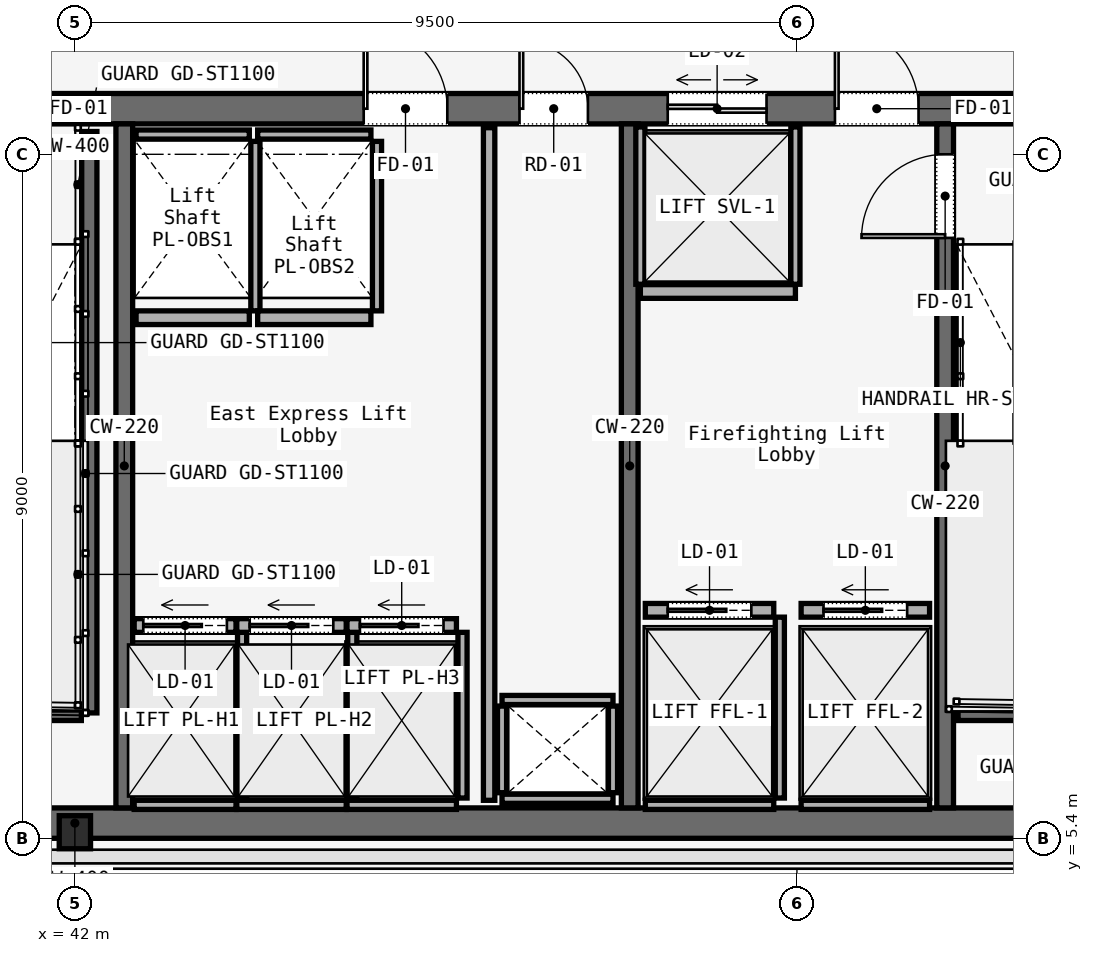
"""IFC4 building model, lengths in metres.
Left out: names, types, materials, properties, quantities, classifications, styles, units other than length and angle.
Written with IfcOpenShell. Run it as: python <this file> out.ifc"""

import sys

from ifc_helpers import new_model, si_unit, direction, frame, frame_2d, origin, origin_2d, place, context, subcontext, project, spatial, rectangle, i_section, extrude, element, fill, save


model = new_model("IFC4")
c1 = context("Model", 3, precision=1e-05, world=origin(), true_north=direction((0.0, 1.0)))
c2 = subcontext(c1, "Body", "Model", "MODEL_VIEW")
j1 = project(units=[si_unit("LENGTHUNIT", "METRE"), si_unit("PLANEANGLEUNIT", "RADIAN")], contexts=[c1])
p1 = place(None, origin())
s1 = spatial("IfcSite", under=j1, at=p1, CompositionType="ELEMENT")
p2 = place(p1, origin())
s2 = spatial("IfcBuilding", under=s1, at=p2, CompositionType="ELEMENT")
p3 = place(p2, frame((0.0, 0.0, 237.0)))
s3 = spatial("IfcBuildingStorey", under=s2, at=p3, CompositionType="ELEMENT", Elevation=237.0)
p4 = place(p3, frame((26.45, 15.0, 0.0), z_axis=(0.0, 0.0, 1.0), x_axis=(1.0, 0.0, 0.0)))
e1 = element("IfcWall", 1, at=p4, inside=s3, PredefinedType="SOLIDWALL", context=c2, shape_type="SweptSolid", body=[
    extrude(rectangle(XDim=31.1, YDim=0.4, at=frame_2d((15.55, 0.0))), origin(), (0.0, 0.0, 1.0), 3.58),
])
p5 = place(p4, frame((1.65, 0.0, 0.0)))
e2 = element("IfcOpeningElement", 2, at=p5, cuts=e1, PredefinedType="OPENING", context=c2, shape_type="SweptSolid", body=[
    extrude(rectangle(XDim=1.1, YDim=2.2, at=frame_2d((0.55, 1.1))), frame((0.0, 0.2, 0.0), z_axis=(0.0, -1.0, 0.0), x_axis=(1.0, 0.0, 0.0)), (0.0, 0.0, 1.0), 0.4),
])
p6 = place(p4, frame((13.65, 0.0, 0.0)))
e3 = element("IfcOpeningElement", 3, at=p6, cuts=e1, PredefinedType="OPENING", context=c2, shape_type="SweptSolid", body=[
    extrude(rectangle(XDim=1.1, YDim=2.2, at=frame_2d((0.55, 1.1))), frame((0.0, 0.2, 0.0), z_axis=(0.0, -1.0, 0.0), x_axis=(1.0, 0.0, 0.0)), (0.0, 0.0, 1.0), 0.4),
])
p7 = place(p4, frame((25.55, 0.0, 0.0)))
e4 = element("IfcOpeningElement", 4, at=p7, cuts=e1, PredefinedType="OPENING", context=c2, shape_type="SweptSolid", body=[
    extrude(rectangle(XDim=1.1, YDim=2.2, at=frame_2d((0.55, 1.1))), frame((0.0, 0.2, 0.0), z_axis=(0.0, -1.0, 0.0), x_axis=(1.0, 0.0, 0.0)), (0.0, 0.0, 1.0), 0.4),
])
p8 = place(p4, frame((19.35, 0.0, 0.0)))
e5 = element("IfcOpeningElement", 5, at=p8, cuts=e1, PredefinedType="OPENING", context=c2, shape_type="SweptSolid", body=[
    extrude(rectangle(XDim=1.1, YDim=2.2, at=frame_2d((0.55, 1.1))), frame((0.0, 0.2, 0.0), z_axis=(0.0, -1.0, 0.0), x_axis=(1.0, 0.0, 0.0)), (0.0, 0.0, 1.0), 0.4),
])
p9 = place(p4, frame((21.4, 0.0, 0.0)))
e6 = element("IfcOpeningElement", 6, at=p9, cuts=e1, PredefinedType="OPENING", context=c2, shape_type="SweptSolid", body=[
    extrude(rectangle(XDim=0.9, YDim=2.1, at=frame_2d((0.45, 1.05))), frame((0.0, 0.2, 0.0), z_axis=(0.0, -1.0, 0.0), x_axis=(1.0, 0.0, 0.0)), (0.0, 0.0, 1.0), 0.4),
])
p10 = place(p4, frame((6.54, 0.0, 0.0)))
e7 = element("IfcOpeningElement", 7, at=p10, cuts=e1, PredefinedType="OPENING", context=c2, shape_type="SweptSolid", body=[
    extrude(rectangle(XDim=0.95, YDim=2.2, at=frame_2d((0.475, 1.1))), frame((0.0, 0.2, 0.0), z_axis=(0.0, -1.0, 0.0), x_axis=(1.0, 0.0, 0.0)), (0.0, 0.0, 1.0), 0.4),
])
p11 = place(p4, frame((10.49, 0.0, 0.0)))
e8 = element("IfcOpeningElement", 8, at=p11, cuts=e1, PredefinedType="OPENING", context=c2, shape_type="SweptSolid", body=[
    extrude(rectangle(XDim=0.95, YDim=2.2, at=frame_2d((0.475, 1.1))), frame((0.0, 0.2, 0.0), z_axis=(0.0, -1.0, 0.0), x_axis=(1.0, 0.0, 0.0)), (0.0, 0.0, 1.0), 0.4),
])
p12 = place(p4, frame((23.35, 0.0, 0.0)))
e9 = element("IfcOpeningElement", 9, at=p12, cuts=e1, PredefinedType="OPENING", context=c2, shape_type="SweptSolid", body=[
    extrude(rectangle(XDim=1.3, YDim=2.3, at=frame_2d((0.65, 1.15))), frame((0.0, 0.2, 0.0), z_axis=(0.0, -1.0, 0.0), x_axis=(1.0, 0.0, 0.0)), (0.0, 0.0, 1.0), 0.4),
])
p13 = place(p3, frame((26.45, 5.6, 0.0), z_axis=(0.0, 0.0, 1.0), x_axis=(1.0, 0.0, 0.0)))
e10 = element("IfcWall", 10, at=p13, inside=s3, PredefinedType="SOLIDWALL", context=c2, shape_type="SweptSolid", body=[
    extrude(rectangle(XDim=31.1, YDim=0.4, at=frame_2d((15.55, 0.0))), origin(), (0.0, 0.0, 1.0), 3.58),
])
for number, where, z_axis, x_axis in (
    (11, (42.65, 5.8, 0.0), (0.0, 0.0, 1.0), (0.0, 1.0, 0.0)),
    (12, (49.3, 5.8, 0.0), (0.0, 0.0, 1.0), (0.0, 1.0, 0.0)),
):
    element("IfcWall", number, at=place(p3, frame(where, z_axis=z_axis, x_axis=x_axis)), inside=s3, PredefinedType="SOLIDWALL", context=c2, shape_type="SweptSolid", body=[
        extrude(rectangle(XDim=9.0, YDim=0.22, at=frame_2d((4.5, 0.0))), origin(), (0.0, 0.0, 1.0), 3.58),
    ])
p14 = place(p3, frame((53.45, 5.8, 0.0), z_axis=(0.0, 0.0, 1.0), x_axis=(0.0, 1.0, 0.0)))
e13 = element("IfcWall", 13, at=p14, inside=s3, PredefinedType="SOLIDWALL", context=c2, shape_type="SweptSolid", body=[
    extrude(rectangle(XDim=9.0, YDim=0.22, at=frame_2d((4.5, 0.0))), origin(), (0.0, 0.0, 1.0), 3.58),
])
p15 = place(p14, frame((7.5, 0.0, 0.0)))
e14 = element("IfcOpeningElement", 14, at=p15, cuts=e13, PredefinedType="OPENING", context=c2, shape_type="SweptSolid", body=[
    extrude(rectangle(XDim=1.1, YDim=2.2, at=frame_2d((0.55, 1.1))), frame((0.0, 0.11, 0.0), z_axis=(0.0, -1.0, 0.0), x_axis=(1.0, 0.0, 0.0)), (0.0, 0.0, 1.0), 0.22),
])
p16 = place(p3, frame((42.0, 5.48, 0.0), z_axis=(0.0, 0.0, 1.0), x_axis=(1.0, 0.0, 0.0)))
e15 = element("IfcColumn", 15, at=p16, inside=s3, PredefinedType="COLUMN", context=c2, shape_type="SweptSolid", body=[
    extrude(i_section(OverallWidth=0.412, OverallDepth=0.435, WebThickness=0.036, FlangeThickness=0.044, FilletRadius=0.015, at=origin_2d()), origin(), (0.0, 0.0, 1.0), 3.58),
])
p17 = place(p3, frame((42.19, 14.7, 0.0), z_axis=(0.0, 0.0, 1.0), x_axis=(0.0, -1.0, 0.0)))
e16 = element("IfcWall", 16, at=p17, inside=s3, PredefinedType="SOLIDWALL", context=c2, shape_type="SweptSolid", body=[
    extrude(rectangle(XDim=7.65, YDim=0.2, at=frame_2d((3.825, 0.0))), origin(), (0.0, 0.0, 1.0), 3.8),
])
for number, where, z_axis, x_axis in (
    (17, (38.97, 7.05, 0.0), (0.0, 0.0, 1.0), (1.0, 0.0, 0.0)),
    (18, (53.62, 7.05, 0.0), (0.0, 0.0, 1.0), (1.0, 0.0, 0.0)),
):
    element("IfcWall", number, at=place(p3, frame(where, z_axis=z_axis, x_axis=x_axis)), inside=s3, PredefinedType="SOLIDWALL", context=c2, shape_type="SweptSolid", body=[
        extrude(rectangle(XDim=3.115, YDim=0.2, at=frame_2d((1.558, 0.0))), origin(), (0.0, 0.0, 1.0), 3.8),
    ])
for number, where, z_axis, x_axis in (
    (19, (47.62, 5.92, 0.0), (0.0, 0.0, 1.0), (1.0, 0.0, 0.0)),
    (20, (47.62, 7.22, 0.0), (0.0, 0.0, 1.0), (1.0, 0.0, 0.0)),
):
    element("IfcWall", number, at=place(p3, frame(where, z_axis=z_axis, x_axis=x_axis)), inside=s3, PredefinedType="SOLIDWALL", context=c2, shape_type="SweptSolid", body=[
        extrude(rectangle(XDim=1.46, YDim=0.12, at=frame_2d((0.73, 0.0))), origin(), (0.0, 0.0, 1.0), 3.01),
    ])
for number, where, z_axis, x_axis in (
    (21, (47.62, 6.0, 0.0), (0.0, 0.0, 1.0), (0.0, 1.0, 0.0)),
    (22, (49.08, 6.0, 0.0), (0.0, 0.0, 1.0), (0.0, 1.0, 0.0)),
):
    element("IfcWall", number, at=place(p3, frame(where, z_axis=z_axis, x_axis=x_axis)), inside=s3, PredefinedType="SOLIDWALL", context=c2, shape_type="SweptSolid", body=[
        extrude(rectangle(XDim=1.14, YDim=0.12, at=frame_2d((0.57, 0.0))), origin(), (0.0, 0.0, 1.0), 3.01),
    ])
p18 = place(p3, frame((47.45, 5.9, 0.0), z_axis=(0.0, 0.0, 1.0), x_axis=(0.0, 1.0, 0.0)))
e23 = element("IfcWall", 23, at=p18, inside=s3, PredefinedType="PARTITIONING", context=c2, shape_type="SweptSolid", body=[
    extrude(rectangle(XDim=8.85, YDim=0.15, at=frame_2d((4.425, 0.0))), origin(), (0.0, 0.0, 1.0), 3.01),
])
p19 = place(p3, frame((42.78, 8.2, 0.0), z_axis=(0.0, 0.0, 1.0), x_axis=(1.0, 0.0, 0.0)))
e24 = element("IfcWall", 24, at=p19, inside=s3, PredefinedType="SOLIDWALL", context=c2, shape_type="SweptSolid", body=[
    extrude(rectangle(XDim=1.34, YDim=0.18, at=frame_2d((0.67, 0.0))), origin(), (0.0, 0.0, 1.0), 3.01),
])
p20 = place(p19, frame((0.12, 0.0, 0.0)))
e25 = element("IfcOpeningElement", 25, at=p20, cuts=e24, PredefinedType="OPENING", context=c2, shape_type="SweptSolid", body=[
    extrude(rectangle(XDim=1.1, YDim=2.2, at=frame_2d((0.55, 1.1))), frame((0.0, 0.09, 0.0), z_axis=(0.0, -1.0, 0.0), x_axis=(1.0, 0.0, 0.0)), (0.0, 0.0, 1.0), 0.18),
])
p21 = place(p3, frame((42.78, 5.84, 0.0), z_axis=(0.0, 0.0, 1.0), x_axis=(1.0, 0.0, 0.0)))
e26 = element("IfcWall", 26, at=p21, inside=s3, PredefinedType="SOLIDWALL", context=c2, shape_type="SweptSolid", body=[
    extrude(rectangle(XDim=1.34, YDim=0.12, at=frame_2d((0.67, 0.0))), origin(), (0.0, 0.0, 1.0), 3.01),
])
p22 = place(p3, frame((44.2, 5.93, 0.0), z_axis=(0.0, 0.0, 1.0), x_axis=(0.0, 1.0, 0.0)))
e27 = element("IfcWall", 27, at=p22, inside=s3, PredefinedType="SOLIDWALL", context=c2, shape_type="SweptSolid", body=[
    extrude(rectangle(XDim=2.18, YDim=0.12, at=frame_2d((1.09, 0.0))), origin(), (0.0, 0.0, 1.0), 3.01),
])
p23 = place(p3, frame((44.13, 8.2, 0.0), z_axis=(0.0, 0.0, 1.0), x_axis=(1.0, 0.0, 0.0)))
e28 = element("IfcWall", 28, at=p23, inside=s3, PredefinedType="SOLIDWALL", context=c2, shape_type="SweptSolid", body=[
    extrude(rectangle(XDim=1.44, YDim=0.18, at=frame_2d((0.72, 0.0))), origin(), (0.0, 0.0, 1.0), 3.01),
])
p24 = place(p23, frame((0.17, 0.0, 0.0)))
e29 = element("IfcOpeningElement", 29, at=p24, cuts=e28, PredefinedType="OPENING", context=c2, shape_type="SweptSolid", body=[
    extrude(rectangle(XDim=1.1, YDim=2.2, at=frame_2d((0.55, 1.1))), frame((0.0, 0.09, 0.0), z_axis=(0.0, -1.0, 0.0), x_axis=(1.0, 0.0, 0.0)), (0.0, 0.0, 1.0), 0.18),
])
p25 = place(p3, frame((44.13, 5.84, 0.0), z_axis=(0.0, 0.0, 1.0), x_axis=(1.0, 0.0, 0.0)))
e30 = element("IfcWall", 30, at=p25, inside=s3, PredefinedType="SOLIDWALL", context=c2, shape_type="SweptSolid", body=[
    extrude(rectangle(XDim=1.44, YDim=0.12, at=frame_2d((0.72, 0.0))), origin(), (0.0, 0.0, 1.0), 3.01),
])
p26 = place(p3, frame((45.65, 5.93, 0.0), z_axis=(0.0, 0.0, 1.0), x_axis=(0.0, 1.0, 0.0)))
e31 = element("IfcWall", 31, at=p26, inside=s3, PredefinedType="SOLIDWALL", context=c2, shape_type="SweptSolid", body=[
    extrude(rectangle(XDim=2.18, YDim=0.12, at=frame_2d((1.09, 0.0))), origin(), (0.0, 0.0, 1.0), 3.01),
])
p27 = place(p3, frame((45.58, 8.2, 0.0), z_axis=(0.0, 0.0, 1.0), x_axis=(1.0, 0.0, 0.0)))
e32 = element("IfcWall", 32, at=p27, inside=s3, PredefinedType="SOLIDWALL", context=c2, shape_type="SweptSolid", body=[
    extrude(rectangle(XDim=1.44, YDim=0.18, at=frame_2d((0.72, 0.0))), origin(), (0.0, 0.0, 1.0), 3.01),
])
p28 = place(p27, frame((0.17, 0.0, 0.0)))
e33 = element("IfcOpeningElement", 33, at=p28, cuts=e32, PredefinedType="OPENING", context=c2, shape_type="SweptSolid", body=[
    extrude(rectangle(XDim=1.1, YDim=2.2, at=frame_2d((0.55, 1.1))), frame((0.0, 0.09, 0.0), z_axis=(0.0, -1.0, 0.0), x_axis=(1.0, 0.0, 0.0)), (0.0, 0.0, 1.0), 0.18),
])
p29 = place(p3, frame((45.58, 5.84, 0.0), z_axis=(0.0, 0.0, 1.0), x_axis=(1.0, 0.0, 0.0)))
e34 = element("IfcWall", 34, at=p29, inside=s3, PredefinedType="SOLIDWALL", context=c2, shape_type="SweptSolid", body=[
    extrude(rectangle(XDim=1.44, YDim=0.12, at=frame_2d((0.72, 0.0))), origin(), (0.0, 0.0, 1.0), 3.01),
])
p30 = place(p3, frame((47.1, 5.93, 0.0), z_axis=(0.0, 0.0, 1.0), x_axis=(0.0, 1.0, 0.0)))
e35 = element("IfcWall", 35, at=p30, inside=s3, PredefinedType="SOLIDWALL", context=c2, shape_type="SweptSolid", body=[
    extrude(rectangle(XDim=2.18, YDim=0.12, at=frame_2d((1.09, 0.0))), origin(), (0.0, 0.0, 1.0), 3.01),
])
p31 = place(p3, frame((42.805, 12.25, 0.0), z_axis=(0.0, 0.0, 1.0), x_axis=(1.0, 0.0, 0.0)))
e36 = element("IfcWall", 36, at=p31, inside=s3, PredefinedType="SOLIDWALL", context=c2, shape_type="SweptSolid", body=[
    extrude(rectangle(XDim=1.49, YDim=0.18, at=frame_2d((0.745, 0.0))), origin(), (0.0, 0.0, 1.0), 3.01),
])
p32 = place(p3, frame((42.805, 14.66, 0.0), z_axis=(0.0, 0.0, 1.0), x_axis=(1.0, 0.0, 0.0)))
e37 = element("IfcWall", 37, at=p32, inside=s3, PredefinedType="SOLIDWALL", context=c2, shape_type="SweptSolid", body=[
    extrude(rectangle(XDim=1.49, YDim=0.12, at=frame_2d((0.745, 0.0))), origin(), (0.0, 0.0, 1.0), 3.01),
])
p33 = place(p3, frame((44.375, 12.34, 0.0), z_axis=(0.0, 0.0, 1.0), x_axis=(0.0, 1.0, 0.0)))
e38 = element("IfcWall", 38, at=p33, inside=s3, PredefinedType="SOLIDWALL", context=c2, shape_type="SweptSolid", body=[
    extrude(rectangle(XDim=2.23, YDim=0.12, at=frame_2d((1.115, 0.0))), origin(), (0.0, 0.0, 1.0), 3.01),
])
p34 = place(p3, frame((44.405, 12.25, 0.0), z_axis=(0.0, 0.0, 1.0), x_axis=(1.0, 0.0, 0.0)))
e39 = element("IfcWall", 39, at=p34, inside=s3, PredefinedType="SOLIDWALL", context=c2, shape_type="SweptSolid", body=[
    extrude(rectangle(XDim=1.49, YDim=0.18, at=frame_2d((0.745, 0.0))), origin(), (0.0, 0.0, 1.0), 3.01),
])
p35 = place(p3, frame((44.405, 14.66, 0.0), z_axis=(0.0, 0.0, 1.0), x_axis=(1.0, 0.0, 0.0)))
e40 = element("IfcWall", 40, at=p35, inside=s3, PredefinedType="SOLIDWALL", context=c2, shape_type="SweptSolid", body=[
    extrude(rectangle(XDim=1.49, YDim=0.12, at=frame_2d((0.745, 0.0))), origin(), (0.0, 0.0, 1.0), 3.01),
])
p36 = place(p3, frame((45.975, 12.34, 0.0), z_axis=(0.0, 0.0, 1.0), x_axis=(0.0, 1.0, 0.0)))
e41 = element("IfcWall", 41, at=p36, inside=s3, PredefinedType="SOLIDWALL", context=c2, shape_type="SweptSolid", body=[
    extrude(rectangle(XDim=2.23, YDim=0.12, at=frame_2d((1.115, 0.0))), origin(), (0.0, 0.0, 1.0), 3.01),
])
p37 = place(p3, frame((49.505, 8.4, 0.0), z_axis=(0.0, 0.0, 1.0), x_axis=(1.0, 0.0, 0.0)))
e42 = element("IfcWall", 42, at=p37, inside=s3, PredefinedType="SOLIDWALL", context=c2, shape_type="SweptSolid", body=[
    extrude(rectangle(XDim=1.69, YDim=0.18, at=frame_2d((0.845, 0.0))), origin(), (0.0, 0.0, 1.0), 3.01),
])
p38 = place(p37, frame((0.295, 0.0, 0.0)))
e43 = element("IfcOpeningElement", 43, at=p38, cuts=e42, PredefinedType="OPENING", context=c2, shape_type="SweptSolid", body=[
    extrude(rectangle(XDim=1.1, YDim=2.2, at=frame_2d((0.55, 1.1))), frame((0.0, 0.09, 0.0), z_axis=(0.0, -1.0, 0.0), x_axis=(1.0, 0.0, 0.0)), (0.0, 0.0, 1.0), 0.18),
])
p39 = place(p3, frame((49.505, 5.84, 0.0), z_axis=(0.0, 0.0, 1.0), x_axis=(1.0, 0.0, 0.0)))
e44 = element("IfcWall", 44, at=p39, inside=s3, PredefinedType="SOLIDWALL", context=c2, shape_type="SweptSolid", body=[
    extrude(rectangle(XDim=1.69, YDim=0.12, at=frame_2d((0.845, 0.0))), origin(), (0.0, 0.0, 1.0), 3.01),
])
p40 = place(p3, frame((51.275, 5.93, 0.0), z_axis=(0.0, 0.0, 1.0), x_axis=(0.0, 1.0, 0.0)))
e45 = element("IfcWall", 45, at=p40, inside=s3, PredefinedType="SOLIDWALL", context=c2, shape_type="SweptSolid", body=[
    extrude(rectangle(XDim=2.38, YDim=0.12, at=frame_2d((1.19, 0.0))), origin(), (0.0, 0.0, 1.0), 3.01),
])
p41 = place(p3, frame((51.555, 8.4, 0.0), z_axis=(0.0, 0.0, 1.0), x_axis=(1.0, 0.0, 0.0)))
e46 = element("IfcWall", 46, at=p41, inside=s3, PredefinedType="SOLIDWALL", context=c2, shape_type="SweptSolid", body=[
    extrude(rectangle(XDim=1.69, YDim=0.18, at=frame_2d((0.845, 0.0))), origin(), (0.0, 0.0, 1.0), 3.01),
])
p42 = place(p41, frame((0.295, 0.0, 0.0)))
e47 = element("IfcOpeningElement", 47, at=p42, cuts=e46, PredefinedType="OPENING", context=c2, shape_type="SweptSolid", body=[
    extrude(rectangle(XDim=1.1, YDim=2.2, at=frame_2d((0.55, 1.1))), frame((0.0, 0.09, 0.0), z_axis=(0.0, -1.0, 0.0), x_axis=(1.0, 0.0, 0.0)), (0.0, 0.0, 1.0), 0.18),
])
p43 = place(p3, frame((51.555, 5.84, 0.0), z_axis=(0.0, 0.0, 1.0), x_axis=(1.0, 0.0, 0.0)))
e48 = element("IfcWall", 48, at=p43, inside=s3, PredefinedType="SOLIDWALL", context=c2, shape_type="SweptSolid", body=[
    extrude(rectangle(XDim=1.69, YDim=0.12, at=frame_2d((0.845, 0.0))), origin(), (0.0, 0.0, 1.0), 3.01),
])
p44 = place(p3, frame((49.44, 12.595, 0.0), z_axis=(0.0, 0.0, 1.0), x_axis=(1.0, 0.0, 0.0)))
e49 = element("IfcWall", 49, at=p44, inside=s3, PredefinedType="SOLIDWALL", context=c2, shape_type="SweptSolid", body=[
    extrude(rectangle(XDim=2.04, YDim=0.18, at=frame_2d((1.02, 0.0))), origin(), (0.0, 0.0, 1.0), 3.01),
])
for number, where, z_axis, x_axis in (
    (50, (49.44, 12.69, 0.0), (0.0, 0.0, 1.0), (0.0, 1.0, 0.0)),
    (51, (51.48, 12.69, 0.0), (0.0, 0.0, 1.0), (0.0, 1.0, 0.0)),
):
    element("IfcWall", number, at=place(p3, frame(where, z_axis=z_axis, x_axis=x_axis)), inside=s3, PredefinedType="SOLIDWALL", context=c2, shape_type="SweptSolid", body=[
        extrude(rectangle(XDim=2.07, YDim=0.12, at=frame_2d((1.035, 0.0))), origin(), (0.0, 0.0, 1.0), 3.01),
    ])
p45 = place(p7, origin())
e52 = element("IfcDoor", 52, at=p45, inside=s3, OperationType="SINGLE_SWING_RIGHT", PredefinedType="DOOR", context=c2, shape_type="SweptSolid", body=[
    extrude(rectangle(XDim=1.1, YDim=2.2, at=frame_2d((0.55, 1.1))), frame((0.0, 0.025, 0.0), z_axis=(0.0, -1.0, 0.0), x_axis=(1.0, 0.0, 0.0)), (0.0, 0.0, 1.0), 0.05),
])
fill(e4, e52)
p46 = place(p8, origin())
e53 = element("IfcDoor", 53, at=p46, inside=s3, OperationType="SINGLE_SWING_LEFT", PredefinedType="DOOR", context=c2, shape_type="SweptSolid", body=[
    extrude(rectangle(XDim=1.1, YDim=2.2, at=frame_2d((0.55, 1.1))), frame((0.0, 0.025, 0.0), z_axis=(0.0, -1.0, 0.0), x_axis=(1.0, 0.0, 0.0)), (0.0, 0.0, 1.0), 0.05),
])
fill(e5, e53)
p47 = place(p9, origin())
e54 = element("IfcDoor", 54, at=p47, inside=s3, OperationType="SINGLE_SWING_LEFT", PredefinedType="DOOR", context=c2, shape_type="SweptSolid", body=[
    extrude(rectangle(XDim=0.9, YDim=2.1, at=frame_2d((0.45, 1.05))), frame((0.0, 0.025, 0.0), z_axis=(0.0, -1.0, 0.0), x_axis=(1.0, 0.0, 0.0)), (0.0, 0.0, 1.0), 0.05),
])
fill(e6, e54)
p48 = place(p15, origin())
e55 = element("IfcDoor", 55, at=p48, inside=s3, OperationType="SINGLE_SWING_LEFT", PredefinedType="DOOR", context=c2, shape_type="SweptSolid", body=[
    extrude(rectangle(XDim=1.1, YDim=2.2, at=frame_2d((0.55, 1.1))), frame((0.0, 0.025, 0.0), z_axis=(0.0, -1.0, 0.0), x_axis=(1.0, 0.0, 0.0)), (0.0, 0.0, 1.0), 0.05),
])
fill(e14, e55)
p49 = place(p20, origin())
e56 = element("IfcDoor", 56, at=p49, inside=s3, OperationType="SLIDING_TO_LEFT", PredefinedType="DOOR", context=c2, shape_type="SweptSolid", body=[
    extrude(rectangle(XDim=1.1, YDim=2.2, at=frame_2d((0.55, 1.1))), frame((0.0, 0.025, 0.0), z_axis=(0.0, -1.0, 0.0), x_axis=(1.0, 0.0, 0.0)), (0.0, 0.0, 1.0), 0.05),
])
fill(e25, e56)
p50 = place(p24, origin())
e57 = element("IfcDoor", 57, at=p50, inside=s3, OperationType="SLIDING_TO_LEFT", PredefinedType="DOOR", context=c2, shape_type="SweptSolid", body=[
    extrude(rectangle(XDim=1.1, YDim=2.2, at=frame_2d((0.55, 1.1))), frame((0.0, 0.025, 0.0), z_axis=(0.0, -1.0, 0.0), x_axis=(1.0, 0.0, 0.0)), (0.0, 0.0, 1.0), 0.05),
])
fill(e29, e57)
p51 = place(p28, origin())
e58 = element("IfcDoor", 58, at=p51, inside=s3, OperationType="SLIDING_TO_LEFT", PredefinedType="DOOR", context=c2, shape_type="SweptSolid", body=[
    extrude(rectangle(XDim=1.1, YDim=2.2, at=frame_2d((0.55, 1.1))), frame((0.0, 0.025, 0.0), z_axis=(0.0, -1.0, 0.0), x_axis=(1.0, 0.0, 0.0)), (0.0, 0.0, 1.0), 0.05),
])
fill(e33, e58)
p52 = place(p38, origin())
e59 = element("IfcDoor", 59, at=p52, inside=s3, OperationType="SLIDING_TO_LEFT", PredefinedType="DOOR", context=c2, shape_type="SweptSolid", body=[
    extrude(rectangle(XDim=1.1, YDim=2.2, at=frame_2d((0.55, 1.1))), frame((0.0, 0.025, 0.0), z_axis=(0.0, -1.0, 0.0), x_axis=(1.0, 0.0, 0.0)), (0.0, 0.0, 1.0), 0.05),
])
fill(e43, e59)
p53 = place(p42, origin())
e60 = element("IfcDoor", 60, at=p53, inside=s3, OperationType="SLIDING_TO_LEFT", PredefinedType="DOOR", context=c2, shape_type="SweptSolid", body=[
    extrude(rectangle(XDim=1.1, YDim=2.2, at=frame_2d((0.55, 1.1))), frame((0.0, 0.025, 0.0), z_axis=(0.0, -1.0, 0.0), x_axis=(1.0, 0.0, 0.0)), (0.0, 0.0, 1.0), 0.05),
])
fill(e47, e60)
p54 = place(p12, origin())
e61 = element("IfcDoor", 61, at=p54, inside=s3, OperationType="DOUBLE_DOOR_SLIDING", PredefinedType="DOOR", context=c2, shape_type="SweptSolid", body=[
    extrude(rectangle(XDim=1.3, YDim=2.3, at=frame_2d((0.65, 1.15))), frame((0.0, 0.025, 0.0), z_axis=(0.0, -1.0, 0.0), x_axis=(1.0, 0.0, 0.0)), (0.0, 0.0, 1.0), 0.05),
])
fill(e9, e61)
save(model, sys.argv[1])
